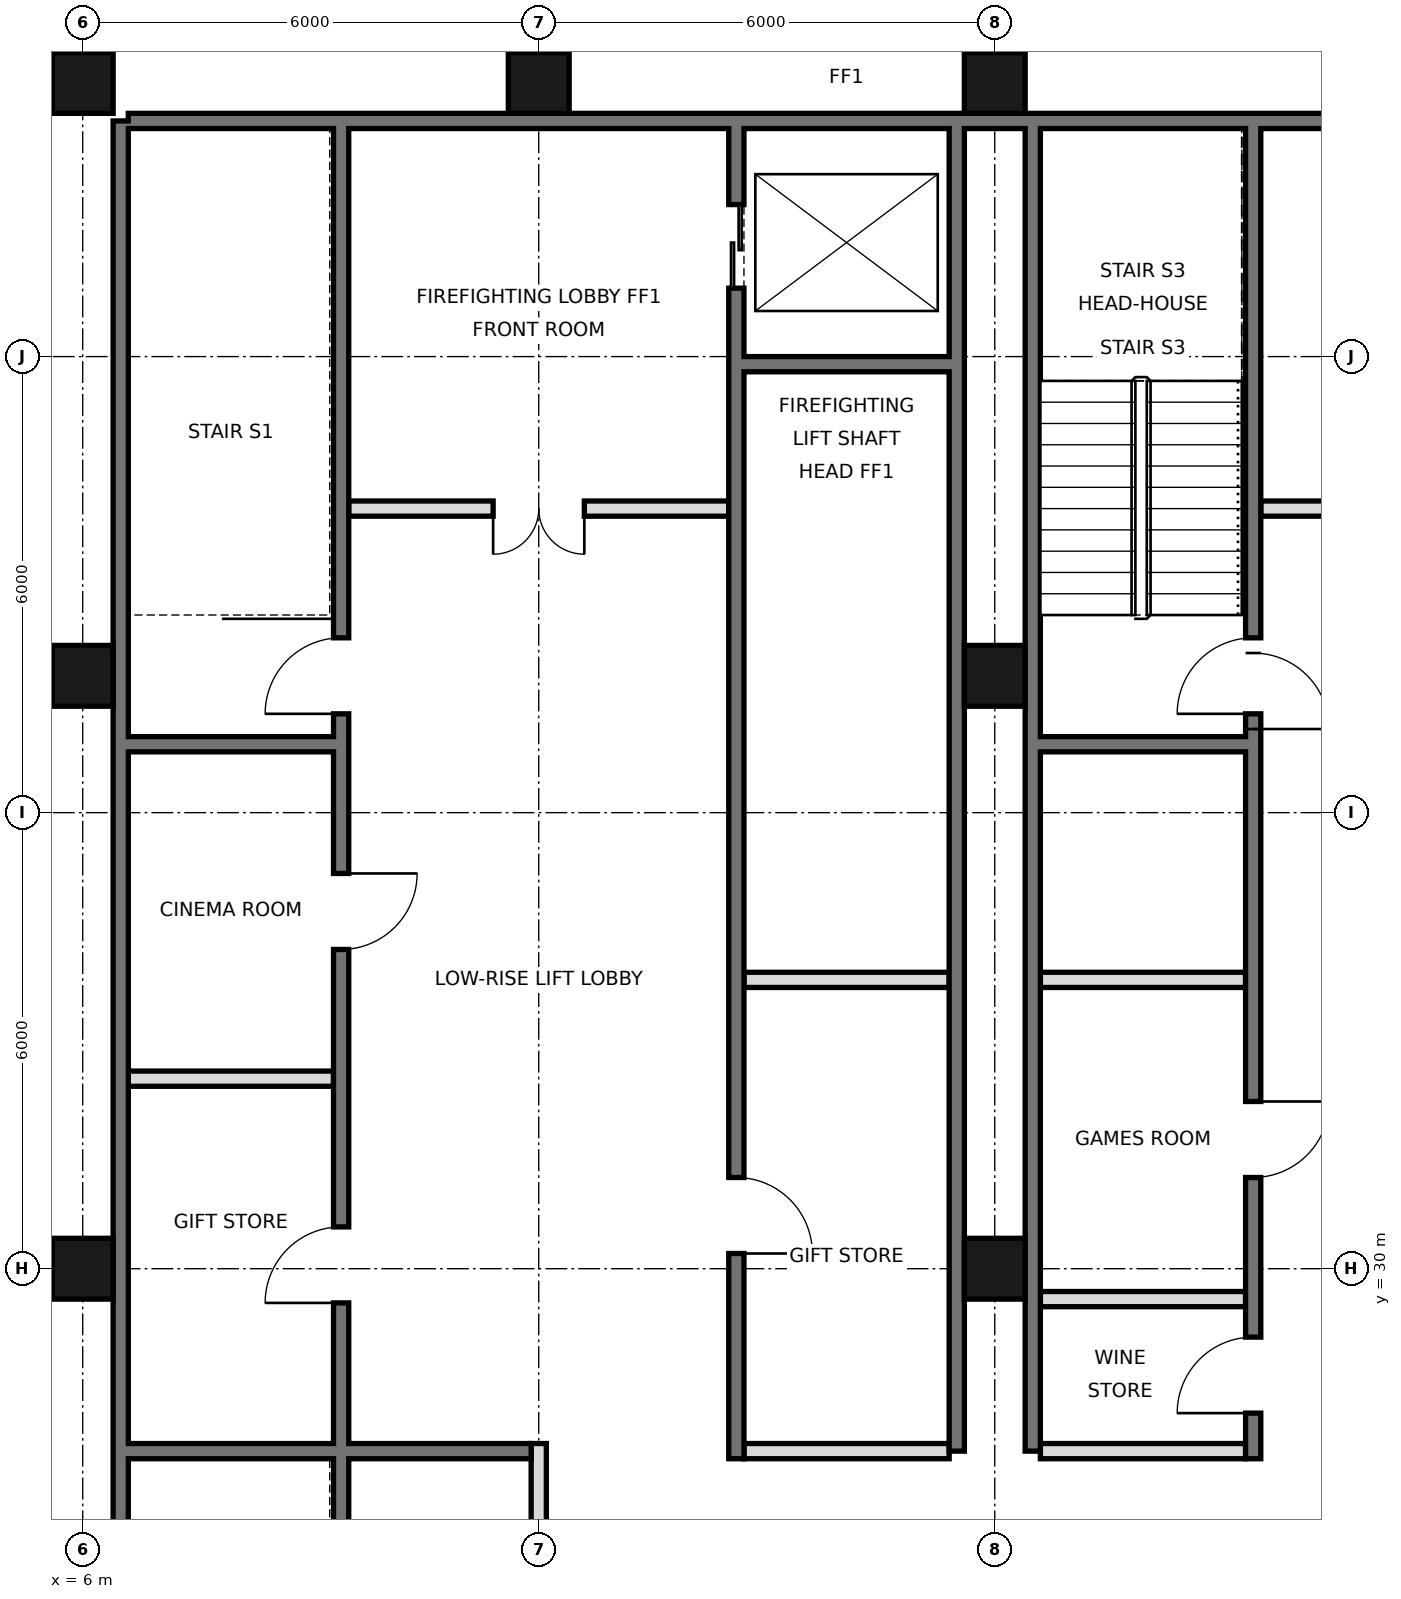
"""IFC4 building model, lengths in metres.
Left out: names, types, materials, properties, quantities, classifications, styles, units other than length and angle.
Written with IfcOpenShell. Run it as: python <this file> out.ifc"""

import sys

from ifc_helpers import new_model, si_unit, direction, frame, frame_2d, origin, origin_2d, place, context, subcontext, project, spatial, rectangle, hollow_rectangle, extrude, element, fill, save


model = new_model("IFC4")
c1 = context("Model", 3, precision=1e-05, world=origin(), true_north=direction((0.0, 1.0)))
c2 = subcontext(c1, "Body", "Model", "MODEL_VIEW")
j1 = project(units=[si_unit("LENGTHUNIT", "METRE"), si_unit("PLANEANGLEUNIT", "RADIAN")], contexts=[c1])
p1 = place(None, origin())
s1 = spatial("IfcSite", under=j1, at=p1, CompositionType="ELEMENT")
p2 = place(p1, origin())
s2 = spatial("IfcBuilding", under=s1, at=p2, CompositionType="ELEMENT")
p3 = place(p2, frame((0.0, 0.0, 353.8)))
s3 = spatial("IfcBuildingStorey", under=s2, at=p3, CompositionType="ELEMENT", Elevation=353.8)
for number, where, z_axis, x_axis in (
    (1, (6.0, 30.0, 0.0), (0.0, 0.0, 1.0), (1.0, 0.0, 0.0)),
    (2, (6.0, 37.8, 0.0), (0.0, 0.0, 1.0), (1.0, 0.0, 0.0)),
    (3, (6.0, 45.6, 0.0), (0.0, 0.0, 1.0), (1.0, 0.0, 0.0)),
    (4, (12.0, 45.6, 0.0), (0.0, 0.0, 1.0), (1.0, 0.0, 0.0)),
    (5, (18.0, 30.0, 0.0), (0.0, 0.0, 1.0), (1.0, 0.0, 0.0)),
    (6, (18.0, 37.8, 0.0), (0.0, 0.0, 1.0), (1.0, 0.0, 0.0)),
    (7, (18.0, 45.6, 0.0), (0.0, 0.0, 1.0), (1.0, 0.0, 0.0)),
):
    element("IfcColumn", number, at=place(p3, frame(where, z_axis=z_axis, x_axis=x_axis)), inside=s3, PredefinedType="COLUMN", context=c2, shape_type="SweptSolid", body=[
        extrude(hollow_rectangle(XDim=0.8, YDim=0.8, WallThickness=0.025, at=origin_2d()), origin(), (0.0, 0.0, 1.0), 3.75),
    ])
p4 = place(p3, frame((6.5, 21.6, 0.0), z_axis=(0.0, 0.0, 1.0), x_axis=(0.0, 1.0, 0.0)))
e8 = element("IfcWall", 8, at=p4, inside=s3, PredefinedType="SOLIDWALL", context=c2, shape_type="SweptSolid", body=[
    extrude(rectangle(XDim=23.5, YDim=0.2, at=frame_2d((11.75, 0.0))), origin(), (0.0, 0.0, 1.0), 3.75),
])
p5 = place(p3, frame((6.6, 45.1, 0.0), z_axis=(0.0, 0.0, 1.0), x_axis=(1.0, 0.0, 0.0)))
e9 = element("IfcWall", 9, at=p5, inside=s3, PredefinedType="SOLIDWALL", context=c2, shape_type="SweptSolid", body=[
    extrude(rectangle(XDim=34.8, YDim=0.2, at=frame_2d((17.4, 0.0))), origin(), (0.0, 0.0, 1.0), 3.75),
])
for number, where, z_axis, x_axis in (
    (10, (17.5, 27.6, 0.0), (0.0, 0.0, 1.0), (0.0, 1.0, 0.0)),
    (11, (18.5, 27.6, 0.0), (0.0, 0.0, 1.0), (0.0, 1.0, 0.0)),
):
    element("IfcWall", number, at=place(p3, frame(where, z_axis=z_axis, x_axis=x_axis)), inside=s3, PredefinedType="SOLIDWALL", context=c2, shape_type="SweptSolid", body=[
        extrude(rectangle(XDim=17.5, YDim=0.2, at=frame_2d((8.75, 0.0))), origin(), (0.0, 0.0, 1.0), 3.75),
    ])
p6 = place(p3, frame((12.0, 21.5, 0.0), z_axis=(0.0, 0.0, 1.0), x_axis=(0.0, 1.0, 0.0)))
e12 = element("IfcWall", 12, at=p6, inside=s3, PredefinedType="PARTITIONING", context=c2, shape_type="SweptSolid", body=[
    extrude(rectangle(XDim=6.2, YDim=0.2, at=frame_2d((3.1, 0.0))), origin(), (0.0, 0.0, 1.0), 3.75),
])
p7 = place(p3, frame((14.6, 27.5, 0.0), z_axis=(0.0, 0.0, 1.0), x_axis=(0.0, 1.0, 0.0)))
e13 = element("IfcWall", 13, at=p7, inside=s3, PredefinedType="SOLIDWALL", context=c2, shape_type="SweptSolid", body=[
    extrude(rectangle(XDim=17.5, YDim=0.2, at=frame_2d((8.75, 0.0))), origin(), (0.0, 0.0, 1.0), 3.75),
])
p8 = place(p7, frame((15.4, 0.0, 0.0)))
e14 = element("IfcOpeningElement", 14, at=p8, cuts=e13, PredefinedType="OPENING", context=c2, shape_type="SweptSolid", body=[
    extrude(rectangle(XDim=1.1, YDim=2.1, at=frame_2d((0.55, 1.05))), frame((0.0, 0.11, 0.0), z_axis=(0.0, -1.0, 0.0), x_axis=(1.0, 0.0, 0.0)), (0.0, 0.0, 1.0), 0.22),
])
p9 = place(p7, frame((2.7, 0.0, 0.0)))
e15 = element("IfcOpeningElement", 15, at=p9, cuts=e13, PredefinedType="OPENING", context=c2, shape_type="SweptSolid", body=[
    extrude(rectangle(XDim=1.0, YDim=2.1, at=frame_2d((0.5, 1.05))), frame((0.0, 0.11, 0.0), z_axis=(0.0, -1.0, 0.0), x_axis=(1.0, 0.0, 0.0)), (0.0, 0.0, 1.0), 0.22),
])
p10 = place(p3, frame((21.4, 27.5, 0.0), z_axis=(0.0, 0.0, 1.0), x_axis=(0.0, 1.0, 0.0)))
e16 = element("IfcWall", 16, at=p10, inside=s3, PredefinedType="SOLIDWALL", context=c2, shape_type="SweptSolid", body=[
    extrude(rectangle(XDim=17.5, YDim=0.2, at=frame_2d((8.75, 0.0))), origin(), (0.0, 0.0, 1.0), 3.75),
])
p11 = place(p10, frame((0.6, 0.0, 0.0)))
e17 = element("IfcOpeningElement", 17, at=p11, cuts=e16, PredefinedType="OPENING", context=c2, shape_type="SweptSolid", body=[
    extrude(rectangle(XDim=1.0, YDim=2.1, at=frame_2d((0.5, 1.05))), frame((0.0, 0.11, 0.0), z_axis=(0.0, -1.0, 0.0), x_axis=(1.0, 0.0, 0.0)), (0.0, 0.0, 1.0), 0.22),
])
p12 = place(p10, frame((3.7, 0.0, 0.0)))
e18 = element("IfcOpeningElement", 18, at=p12, cuts=e16, PredefinedType="OPENING", context=c2, shape_type="SweptSolid", body=[
    extrude(rectangle(XDim=1.0, YDim=2.1, at=frame_2d((0.5, 1.05))), frame((0.0, 0.11, 0.0), z_axis=(0.0, -1.0, 0.0), x_axis=(1.0, 0.0, 0.0)), (0.0, 0.0, 1.0), 0.22),
])
p13 = place(p10, frame((9.8, 0.0, 0.0)))
e19 = element("IfcOpeningElement", 19, at=p13, cuts=e16, PredefinedType="OPENING", context=c2, shape_type="SweptSolid", body=[
    extrude(rectangle(XDim=1.0, YDim=2.1, at=frame_2d((0.5, 1.05))), frame((0.0, 0.11, 0.0), z_axis=(0.0, -1.0, 0.0), x_axis=(1.0, 0.0, 0.0)), (0.0, 0.0, 1.0), 0.22),
])
p14 = place(p3, frame((9.4, 21.5, 0.0), z_axis=(0.0, 0.0, 1.0), x_axis=(0.0, 1.0, 0.0)))
e20 = element("IfcWall", 20, at=p14, inside=s3, PredefinedType="SOLIDWALL", context=c2, shape_type="SweptSolid", body=[
    extrude(rectangle(XDim=23.5, YDim=0.2, at=frame_2d((11.75, 0.0))), origin(), (0.0, 0.0, 1.0), 3.75),
])
p15 = place(p14, frame((8.05, 0.0, 0.0)))
e21 = element("IfcOpeningElement", 21, at=p15, cuts=e20, PredefinedType="OPENING", context=c2, shape_type="SweptSolid", body=[
    extrude(rectangle(XDim=1.0, YDim=2.1, at=frame_2d((0.5, 1.05))), frame((0.0, 0.11, 0.0), z_axis=(0.0, -1.0, 0.0), x_axis=(1.0, 0.0, 0.0)), (0.0, 0.0, 1.0), 0.22),
])
p16 = place(p14, frame((12.7, 0.0, 0.0)))
e22 = element("IfcOpeningElement", 22, at=p16, cuts=e20, PredefinedType="OPENING", context=c2, shape_type="SweptSolid", body=[
    extrude(rectangle(XDim=1.0, YDim=2.1, at=frame_2d((0.5, 1.05))), frame((0.0, 0.11, 0.0), z_axis=(0.0, -1.0, 0.0), x_axis=(1.0, 0.0, 0.0)), (0.0, 0.0, 1.0), 0.22),
])
p17 = place(p14, frame((15.8, 0.0, 0.0)))
e23 = element("IfcOpeningElement", 23, at=p17, cuts=e20, PredefinedType="OPENING", context=c2, shape_type="SweptSolid", body=[
    extrude(rectangle(XDim=1.0, YDim=2.1, at=frame_2d((0.5, 1.05))), frame((0.0, 0.11, 0.0), z_axis=(0.0, -1.0, 0.0), x_axis=(1.0, 0.0, 0.0)), (0.0, 0.0, 1.0), 0.22),
])
p18 = place(p14, frame((0.275, 0.0, 0.0)))
e24 = element("IfcOpeningElement", 24, at=p18, cuts=e20, PredefinedType="OPENING", context=c2, shape_type="SweptSolid", body=[
    extrude(rectangle(XDim=0.9, YDim=2.1, at=frame_2d((0.45, 1.05))), frame((0.0, 0.11, 0.0), z_axis=(0.0, -1.0, 0.0), x_axis=(1.0, 0.0, 0.0)), (0.0, 0.0, 1.0), 0.22),
])
for number, where, z_axis, x_axis in (
    (25, (14.7, 27.6, 0.0), (0.0, 0.0, 1.0), (1.0, 0.0, 0.0)),
    (26, (18.6, 27.6, 0.0), (0.0, 0.0, 1.0), (1.0, 0.0, 0.0)),
):
    element("IfcWall", number, at=place(p3, frame(where, z_axis=z_axis, x_axis=x_axis)), inside=s3, PredefinedType="PARTITIONING", context=c2, shape_type="SweptSolid", body=[
        extrude(rectangle(XDim=2.7, YDim=0.2, at=frame_2d((1.35, 0.0))), origin(), (0.0, 0.0, 1.0), 3.75),
    ])
p19 = place(p3, frame((6.6, 27.6, 0.0), z_axis=(0.0, 0.0, 1.0), x_axis=(1.0, 0.0, 0.0)))
e27 = element("IfcWall", 27, at=p19, inside=s3, PredefinedType="SOLIDWALL", context=c2, shape_type="SweptSolid", body=[
    extrude(rectangle(XDim=5.3, YDim=0.2, at=frame_2d((2.65, 0.0))), origin(), (0.0, 0.0, 1.0), 3.75),
])
for number, where, z_axis, x_axis in (
    (28, (18.6, 29.6, 0.0), (0.0, 0.0, 1.0), (1.0, 0.0, 0.0)),
    (29, (6.6, 32.5, 0.0), (0.0, 0.0, 1.0), (1.0, 0.0, 0.0)),
    (30, (14.7, 33.8, 0.0), (0.0, 0.0, 1.0), (1.0, 0.0, 0.0)),
    (31, (18.6, 33.8, 0.0), (0.0, 0.0, 1.0), (1.0, 0.0, 0.0)),
):
    element("IfcWall", number, at=place(p3, frame(where, z_axis=z_axis, x_axis=x_axis)), inside=s3, PredefinedType="PARTITIONING", context=c2, shape_type="SweptSolid", body=[
        extrude(rectangle(XDim=2.7, YDim=0.2, at=frame_2d((1.35, 0.0))), origin(), (0.0, 0.0, 1.0), 3.75),
    ])
for number, where, z_axis, x_axis in (
    (32, (18.6, 36.9, 0.0), (0.0, 0.0, 1.0), (1.0, 0.0, 0.0)),
    (33, (6.6, 36.9, 0.0), (0.0, 0.0, 1.0), (1.0, 0.0, 0.0)),
):
    element("IfcWall", number, at=place(p3, frame(where, z_axis=z_axis, x_axis=x_axis)), inside=s3, PredefinedType="SOLIDWALL", context=c2, shape_type="SweptSolid", body=[
        extrude(rectangle(XDim=2.7, YDim=0.2, at=frame_2d((1.35, 0.0))), origin(), (0.0, 0.0, 1.0), 3.75),
    ])
p20 = place(p3, frame((21.5, 40.0, 0.0), z_axis=(0.0, 0.0, 1.0), x_axis=(1.0, 0.0, 0.0)))
e34 = element("IfcWall", 34, at=p20, inside=s3, PredefinedType="PARTITIONING", context=c2, shape_type="SweptSolid", body=[
    extrude(rectangle(XDim=7.9, YDim=0.2, at=frame_2d((3.95, 0.0))), origin(), (0.0, 0.0, 1.0), 3.75),
])
p21 = place(p20, frame((1.9, 0.0, 0.0)))
e35 = element("IfcOpeningElement", 35, at=p21, cuts=e34, PredefinedType="OPENING", context=c2, shape_type="SweptSolid", body=[
    extrude(rectangle(XDim=1.2, YDim=2.1, at=frame_2d((0.6, 1.05))), frame((0.0, 0.11, 0.0), z_axis=(0.0, -1.0, 0.0), x_axis=(1.0, 0.0, 0.0)), (0.0, 0.0, 1.0), 0.22),
])
p22 = place(p3, frame((9.5, 40.0, 0.0), z_axis=(0.0, 0.0, 1.0), x_axis=(1.0, 0.0, 0.0)))
e36 = element("IfcWall", 36, at=p22, inside=s3, PredefinedType="PARTITIONING", context=c2, shape_type="SweptSolid", body=[
    extrude(rectangle(XDim=5.0, YDim=0.2, at=frame_2d((2.5, 0.0))), origin(), (0.0, 0.0, 1.0), 3.75),
])
p23 = place(p22, frame((1.9, 0.0, 0.0)))
e37 = element("IfcOpeningElement", 37, at=p23, cuts=e36, PredefinedType="OPENING", context=c2, shape_type="SweptSolid", body=[
    extrude(rectangle(XDim=1.2, YDim=2.1, at=frame_2d((0.6, 1.05))), frame((0.0, 0.11, 0.0), z_axis=(0.0, -1.0, 0.0), x_axis=(1.0, 0.0, 0.0)), (0.0, 0.0, 1.0), 0.22),
])
p24 = place(p3, frame((14.7, 41.9, 0.0), z_axis=(0.0, 0.0, 1.0), x_axis=(1.0, 0.0, 0.0)))
e38 = element("IfcWall", 38, at=p24, inside=s3, PredefinedType="SOLIDWALL", context=c2, shape_type="SweptSolid", body=[
    extrude(rectangle(XDim=2.7, YDim=0.2, at=frame_2d((1.35, 0.0))), origin(), (0.0, 0.0, 1.0), 3.75),
])
p25 = place(p23, frame((1.2, 0.0, 0.0), z_axis=(0.0, 0.0, 1.0), x_axis=(-1.0, 0.0, 0.0)))
e39 = element("IfcDoor", 39, at=p25, inside=s3, OperationType="DOUBLE_DOOR_SINGLE_SWING", PredefinedType="DOOR", context=c2, shape_type="SweptSolid", body=[
    extrude(rectangle(XDim=1.2, YDim=2.1, at=frame_2d((0.6, 1.05))), frame((0.0, 0.025, 0.0), z_axis=(0.0, -1.0, 0.0), x_axis=(1.0, 0.0, 0.0)), (0.0, 0.0, 1.0), 0.05),
])
fill(e37, e39)
p26 = place(p8, origin())
e40 = element("IfcDoor", 40, at=p26, inside=s3, OperationType="DOUBLE_DOOR_SLIDING", PredefinedType="DOOR", context=c2, shape_type="SweptSolid", body=[
    extrude(rectangle(XDim=1.1, YDim=2.1, at=frame_2d((0.55, 1.05))), frame((0.0, 0.025, 0.0), z_axis=(0.0, -1.0, 0.0), x_axis=(1.0, 0.0, 0.0)), (0.0, 0.0, 1.0), 0.05),
])
fill(e14, e40)
p27 = place(p11, origin())
e41 = element("IfcDoor", 41, at=p27, inside=s3, OperationType="SINGLE_SWING_LEFT", PredefinedType="DOOR", context=c2, shape_type="SweptSolid", body=[
    extrude(rectangle(XDim=1.0, YDim=2.1, at=frame_2d((0.5, 1.05))), frame((0.0, 0.025, 0.0), z_axis=(0.0, -1.0, 0.0), x_axis=(1.0, 0.0, 0.0)), (0.0, 0.0, 1.0), 0.05),
])
fill(e17, e41)
p28 = place(p12, origin())
e42 = element("IfcDoor", 42, at=p28, inside=s3, OperationType="SINGLE_SWING_RIGHT", PredefinedType="DOOR", context=c2, shape_type="SweptSolid", body=[
    extrude(rectangle(XDim=1.0, YDim=2.1, at=frame_2d((0.5, 1.05))), frame((0.0, 0.025, 0.0), z_axis=(0.0, -1.0, 0.0), x_axis=(1.0, 0.0, 0.0)), (0.0, 0.0, 1.0), 0.05),
])
fill(e18, e42)
p29 = place(p9, frame((1.0, 0.0, 0.0), z_axis=(0.0, 0.0, 1.0), x_axis=(-1.0, 0.0, 0.0)))
e43 = element("IfcDoor", 43, at=p29, inside=s3, OperationType="SINGLE_SWING_RIGHT", PredefinedType="DOOR", context=c2, shape_type="SweptSolid", body=[
    extrude(rectangle(XDim=1.0, YDim=2.1, at=frame_2d((0.5, 1.05))), frame((0.0, 0.025, 0.0), z_axis=(0.0, -1.0, 0.0), x_axis=(1.0, 0.0, 0.0)), (0.0, 0.0, 1.0), 0.05),
])
fill(e15, e43)
p30 = place(p15, origin())
e44 = element("IfcDoor", 44, at=p30, inside=s3, OperationType="SINGLE_SWING_LEFT", PredefinedType="DOOR", context=c2, shape_type="SweptSolid", body=[
    extrude(rectangle(XDim=1.0, YDim=2.1, at=frame_2d((0.5, 1.05))), frame((0.0, 0.025, 0.0), z_axis=(0.0, -1.0, 0.0), x_axis=(1.0, 0.0, 0.0)), (0.0, 0.0, 1.0), 0.05),
])
fill(e21, e44)
p31 = place(p16, origin())
e45 = element("IfcDoor", 45, at=p31, inside=s3, OperationType="SINGLE_SWING_RIGHT", PredefinedType="DOOR", context=c2, shape_type="SweptSolid", body=[
    extrude(rectangle(XDim=1.0, YDim=2.1, at=frame_2d((0.5, 1.05))), frame((0.0, 0.025, 0.0), z_axis=(0.0, -1.0, 0.0), x_axis=(1.0, 0.0, 0.0)), (0.0, 0.0, 1.0), 0.05),
])
fill(e22, e45)
p32 = place(p17, origin())
e46 = element("IfcDoor", 46, at=p32, inside=s3, OperationType="SINGLE_SWING_LEFT", PredefinedType="DOOR", context=c2, shape_type="SweptSolid", body=[
    extrude(rectangle(XDim=1.0, YDim=2.1, at=frame_2d((0.5, 1.05))), frame((0.0, 0.025, 0.0), z_axis=(0.0, -1.0, 0.0), x_axis=(1.0, 0.0, 0.0)), (0.0, 0.0, 1.0), 0.05),
])
fill(e23, e46)
p33 = place(p13, origin())
e47 = element("IfcDoor", 47, at=p33, inside=s3, OperationType="SINGLE_SWING_LEFT", PredefinedType="DOOR", context=c2, shape_type="SweptSolid", body=[
    extrude(rectangle(XDim=1.0, YDim=2.1, at=frame_2d((0.5, 1.05))), frame((0.0, 0.025, 0.0), z_axis=(0.0, -1.0, 0.0), x_axis=(1.0, 0.0, 0.0)), (0.0, 0.0, 1.0), 0.05),
])
fill(e19, e47)
p34 = place(p2, frame((0.0, 0.0, 357.8)))
p35 = place(p34, frame((21.4, 37.0, 0.0), z_axis=(0.0, 0.0, 1.0), x_axis=(0.0, 1.0, 0.0)))
p36 = place(p35, frame((0.1, 0.0, 0.0)))
p37 = place(p36, frame((1.0, 0.0, 0.0), z_axis=(0.0, 0.0, 1.0), x_axis=(-1.0, 0.0, 0.0)))
e48 = element("IfcDoor", 48, at=p37, inside=s3, OperationType="SINGLE_SWING_RIGHT", PredefinedType="DOOR", context=c2, shape_type="SweptSolid", body=[
    extrude(rectangle(XDim=1.0, YDim=2.1, at=frame_2d((0.5, 1.05))), frame((0.0, 0.025, 0.0), z_axis=(0.0, -1.0, 0.0), x_axis=(1.0, 0.0, 0.0)), (0.0, 0.0, 1.0), 0.05),
])
save(model, sys.argv[1])
